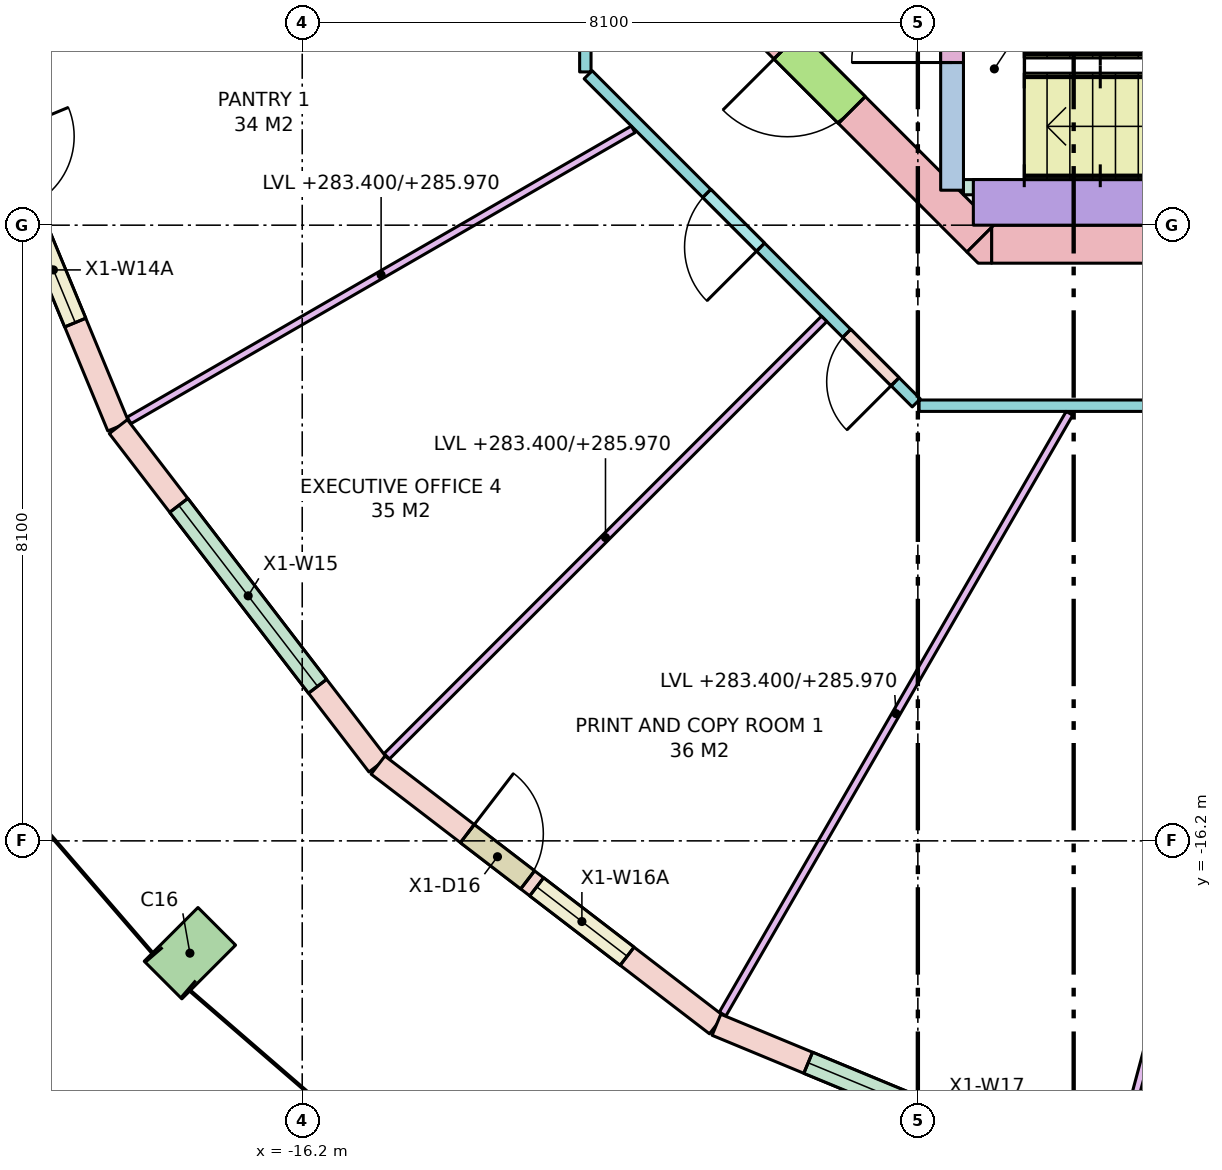
"""IFC4 building model, lengths in metres.
Left out: names, types, materials, properties, quantities, classifications, styles, units other than length and angle.
Written with IfcOpenShell. Run it as: python <this file> out.ifc"""

import sys

from ifc_helpers import new_model, si_unit, direction, frame, frame_2d, origin, origin_2d, place, context, subcontext, project, spatial, polyline, rectangle, outline, extrude, element, fill, save


model = new_model("IFC4")
c1 = context("Model", 3, precision=1e-05, world=origin(), true_north=direction((0.0, 1.0)))
c2 = subcontext(c1, "Body", "Model", "MODEL_VIEW")
j1 = project(units=[si_unit("LENGTHUNIT", "METRE"), si_unit("PLANEANGLEUNIT", "RADIAN")], contexts=[c1])
p1 = place(None, origin())
s1 = spatial("IfcSite", under=j1, at=p1, CompositionType="ELEMENT")
p2 = place(p1, origin())
s2 = spatial("IfcBuilding", under=s1, at=p2, CompositionType="ELEMENT")
p3 = place(p2, frame((0.0, 0.0, 283.4)))
s3 = spatial("IfcBuildingStorey", under=s2, at=p3, CompositionType="ELEMENT", Elevation=283.4)
p4 = place(p3, frame((-17.678, -17.678, 0.0), z_axis=(0.0, 0.0, 1.0), x_axis=(0.707106781187, -0.707106781187, 0.0)))
e1 = element("IfcColumn", 1, at=p4, inside=s3, PredefinedType="COLUMN", context=c2, shape_type="SweptSolid", body=[
    extrude(rectangle(XDim=0.7, YDim=1.0, at=origin_2d()), origin(), (0.0, 0.0, 1.0), 3.7),
])
p5 = place(p3, frame((-7.13, -8.35, -0.28), z_axis=(0.0, 0.0, 1.0), x_axis=(1.0, 0.0, 0.0)))
e2 = element("IfcWall", 2, at=p5, inside=s3, PredefinedType="SHEAR", context=c2, shape_type="SweptSolid", body=[
    extrude(rectangle(XDim=14.26, YDim=0.5, at=frame_2d((7.13, 0.0))), origin(), (0.0, 0.0, 1.0), 3.7),
])
p6 = place(p5, frame((8.08, 0.0, 0.28)))
e3 = element("IfcOpeningElement", 3, at=p6, cuts=e2, PredefinedType="OPENING", context=c2, shape_type="SweptSolid", body=[
    extrude(rectangle(XDim=0.7, YDim=2.1, at=frame_2d((0.35, 1.05))), frame((0.0, 0.26, 0.0), z_axis=(0.0, -1.0, 0.0), x_axis=(1.0, 0.0, 0.0)), (0.0, 0.0, 1.0), 0.52),
])
p7 = place(p5, frame((6.205, 0.0, 0.28)))
e4 = element("IfcOpeningElement", 4, at=p7, cuts=e2, PredefinedType="OPENING", context=c2, shape_type="SweptSolid", body=[
    extrude(rectangle(XDim=0.9, YDim=2.1, at=frame_2d((0.45, 1.05))), frame((0.0, 0.26, 0.0), z_axis=(0.0, -1.0, 0.0), x_axis=(1.0, 0.0, 0.0)), (0.0, 0.0, 1.0), 0.52),
])
p8 = place(p5, frame((10.667, 0.0, 0.28)))
e5 = element("IfcOpeningElement", 5, at=p8, cuts=e2, PredefinedType="OPENING", context=c2, shape_type="SweptSolid", body=[
    extrude(rectangle(XDim=0.9, YDim=2.1, at=frame_2d((0.45, 1.05))), frame((0.0, 0.26, 0.0), z_axis=(0.0, -1.0, 0.0), x_axis=(1.0, 0.0, 0.0)), (0.0, 0.0, 1.0), 0.52),
])
p9 = place(p3, frame((-7.277, -8.277, -0.28), z_axis=(0.0, 0.0, 1.0), x_axis=(-0.707106781187, 0.707106781187, 0.0)))
e6 = element("IfcWall", 6, at=p9, inside=s3, PredefinedType="SHEAR", context=c2, shape_type="SweptSolid", body=[
    extrude(rectangle(XDim=4.243, YDim=0.5, at=frame_2d((2.121, 0.0))), origin(), (0.0, 0.0, 1.0), 3.7),
])
p10 = place(p9, frame((2.393, 0.0, 0.28)))
e7 = element("IfcOpeningElement", 7, at=p10, cuts=e6, PredefinedType="OPENING", context=c2, shape_type="SweptSolid", body=[
    extrude(rectangle(XDim=1.2, YDim=2.1, at=frame_2d((0.6, 1.05))), frame((0.0, 0.26, 0.0), z_axis=(0.0, -1.0, 0.0), x_axis=(1.0, 0.0, 0.0)), (0.0, 0.0, 1.0), 0.52),
])
p11 = place(p3, frame((0.0, 0.0, -0.28)))
e8 = element("IfcWall", 8, at=p11, inside=s3, PredefinedType="SHEAR", context=c2, shape_type="SweptSolid", body=[
    extrude(outline(polyline([(-7.307, -8.6), (-7.454, -8.454), (-7.13, -8.13), (-7.13, -8.6), (-7.307, -8.6)])), origin(), (0.0, 0.0, 1.0), 3.7),
])
p12 = place(p3, frame((-7.65, -7.64, 0.0), z_axis=(0.0, 0.0, 1.0), x_axis=(0.0, 1.0, 0.0)))
e9 = element("IfcWall", 9, at=p12, inside=s3, PredefinedType="SHEAR", context=c2, shape_type="SweptSolid", body=[
    extrude(rectangle(XDim=3.14, YDim=0.3, at=frame_2d((1.57, 0.0))), origin(), (0.0, 0.0, 1.0), 3.42),
])
p13 = place(p12, frame((1.68, 0.0, 0.0)))
e10 = element("IfcOpeningElement", 10, at=p13, cuts=e9, PredefinedType="OPENING", context=c2, shape_type="SweptSolid", body=[
    extrude(rectangle(XDim=1.32, YDim=2.1, at=frame_2d((0.66, 1.05))), frame((0.0, 0.16, 0.0), z_axis=(0.0, -1.0, 0.0), x_axis=(1.0, 0.0, 0.0)), (0.0, 0.0, 1.0), 0.32),
])
p14 = place(p3, frame((-7.5, -7.6, 0.0), z_axis=(0.0, 0.0, 1.0), x_axis=(1.0, 0.0, 0.0)))
e11 = element("IfcWall", 11, at=p14, inside=s3, PredefinedType="SHEAR", context=c2, shape_type="SweptSolid", body=[
    extrude(rectangle(XDim=0.6, YDim=0.2, at=frame_2d((0.3, 0.0))), origin(), (0.0, 0.0, 1.0), 3.42),
])
p15 = place(p3, frame((-7.37, -7.8, 0.0), z_axis=(0.0, 0.0, 1.0), x_axis=(1.0, 0.0, 0.0)))
e12 = element("IfcWall", 12, at=p15, inside=s3, PredefinedType="SHEAR", context=c2, shape_type="SweptSolid", body=[
    extrude(rectangle(XDim=5.37, YDim=0.6, at=frame_2d((2.685, 0.0))), origin(), (0.0, 0.0, 1.0), 3.42),
])
p16 = place(p3, frame((-20.767, -5.565, 0.0), z_axis=(0.0, 0.0, 1.0), x_axis=(0.382702670405, -0.92387156362, 0.0)))
e13 = element("IfcWall", 13, at=p16, inside=s3, PredefinedType="STANDARD", context=c2, shape_type="SweptSolid", body=[
    extrude(rectangle(XDim=5.613, YDim=0.3, at=frame_2d((2.806, 0.0))), origin(), (0.0, 0.0, 1.0), 3.42),
])
p17 = place(p16, frame((1.481, 0.0, 0.0)))
e14 = element("IfcOpeningElement", 14, at=p17, cuts=e13, PredefinedType="OPENING", context=c2, shape_type="SweptSolid", body=[
    extrude(rectangle(XDim=1.0, YDim=2.4, at=frame_2d((0.5, 1.2))), frame((0.0, 0.16, 0.0), z_axis=(0.0, -1.0, 0.0), x_axis=(1.0, 0.0, 0.0)), (0.0, 0.0, 1.0), 0.32),
])
p18 = place(p16, frame((2.631, 0.0, 0.8)))
e15 = element("IfcOpeningElement", 15, at=p18, cuts=e13, PredefinedType="OPENING", context=c2, shape_type="SweptSolid", body=[
    extrude(rectangle(XDim=1.5, YDim=2.4, at=frame_2d((0.75, 1.2))), frame((0.0, 0.16, 0.0), z_axis=(0.0, -1.0, 0.0), x_axis=(1.0, 0.0, 0.0)), (0.0, 0.0, 1.0), 0.32),
])
p19 = place(p3, frame((-18.619, -10.75, 0.0), z_axis=(0.0, 0.0, 1.0), x_axis=(0.608726467567, -0.793380165925, 0.0)))
e16 = element("IfcWall", 16, at=p19, inside=s3, PredefinedType="STANDARD", context=c2, shape_type="SweptSolid", body=[
    extrude(rectangle(XDim=5.613, YDim=0.3, at=frame_2d((2.806, 0.0))), origin(), (0.0, 0.0, 1.0), 3.42),
])
p20 = place(p19, frame((1.306, 0.0, 0.8)))
e17 = element("IfcOpeningElement", 17, at=p20, cuts=e16, PredefinedType="OPENING", context=c2, shape_type="SweptSolid", body=[
    extrude(rectangle(XDim=3.0, YDim=2.4, at=frame_2d((1.5, 1.2))), frame((0.0, 0.16, 0.0), z_axis=(0.0, -1.0, 0.0), x_axis=(1.0, 0.0, 0.0)), (0.0, 0.0, 1.0), 0.32),
])
p21 = place(p3, frame((-15.203, -15.203, 0.0), z_axis=(0.0, 0.0, 1.0), x_axis=(0.793380165925, -0.608726467567, 0.0)))
e18 = element("IfcWall", 18, at=p21, inside=s3, PredefinedType="STANDARD", context=c2, shape_type="SweptSolid", body=[
    extrude(rectangle(XDim=5.613, YDim=0.3, at=frame_2d((2.806, 0.0))), origin(), (0.0, 0.0, 1.0), 3.42),
])
p22 = place(p21, frame((1.481, 0.0, 0.0)))
e19 = element("IfcOpeningElement", 19, at=p22, cuts=e18, PredefinedType="OPENING", context=c2, shape_type="SweptSolid", body=[
    extrude(rectangle(XDim=1.0, YDim=2.4, at=frame_2d((0.5, 1.2))), frame((0.0, 0.16, 0.0), z_axis=(0.0, -1.0, 0.0), x_axis=(1.0, 0.0, 0.0)), (0.0, 0.0, 1.0), 0.32),
])
p23 = place(p21, frame((2.631, 0.0, 0.8)))
e20 = element("IfcOpeningElement", 20, at=p23, cuts=e18, PredefinedType="OPENING", context=c2, shape_type="SweptSolid", body=[
    extrude(rectangle(XDim=1.5, YDim=2.4, at=frame_2d((0.75, 1.2))), frame((0.0, 0.16, 0.0), z_axis=(0.0, -1.0, 0.0), x_axis=(1.0, 0.0, 0.0)), (0.0, 0.0, 1.0), 0.32),
])
p24 = place(p3, frame((-10.75, -18.619, 0.0), z_axis=(0.0, 0.0, 1.0), x_axis=(0.92387156362, -0.382702670405, 0.0)))
e21 = element("IfcWall", 21, at=p24, inside=s3, PredefinedType="STANDARD", context=c2, shape_type="SweptSolid", body=[
    extrude(rectangle(XDim=5.613, YDim=0.3, at=frame_2d((2.806, 0.0))), origin(), (0.0, 0.0, 1.0), 3.42),
])
p25 = place(p24, frame((1.306, 0.0, 0.8)))
e22 = element("IfcOpeningElement", 22, at=p25, cuts=e21, PredefinedType="OPENING", context=c2, shape_type="SweptSolid", body=[
    extrude(rectangle(XDim=3.0, YDim=2.4, at=frame_2d((1.5, 1.2))), frame((0.0, 0.16, 0.0), z_axis=(0.0, -1.0, 0.0), x_axis=(1.0, 0.0, 0.0)), (0.0, 0.0, 1.0), 0.32),
])
p26 = place(p3, frame((8.084, -10.475, 0.0), z_axis=(0.0, 0.0, 1.0), x_axis=(-1.0, 0.0, 0.0)))
e23 = element("IfcWall", 23, at=p26, inside=s3, PredefinedType="PARTITIONING", context=c2, shape_type="SweptSolid", body=[
    extrude(rectangle(XDim=16.167, YDim=0.15, at=frame_2d((8.084, 0.0))), origin(), (0.0, 0.0, 1.0), 2.57),
])
p27 = place(p26, frame((12.065, 0.0, 0.0)))
e24 = element("IfcOpeningElement", 24, at=p27, cuts=e23, PredefinedType="OPENING", context=c2, shape_type="SweptSolid", body=[
    extrude(rectangle(XDim=0.9, YDim=2.1, at=frame_2d((0.45, 1.05))), frame((0.0, 0.085, 0.0), z_axis=(0.0, -1.0, 0.0), x_axis=(1.0, 0.0, 0.0)), (0.0, 0.0, 1.0), 0.17),
])
p28 = place(p26, frame((7.584, 0.0, 0.0)))
e25 = element("IfcOpeningElement", 25, at=p28, cuts=e23, PredefinedType="OPENING", context=c2, shape_type="SweptSolid", body=[
    extrude(rectangle(XDim=1.0, YDim=2.1, at=frame_2d((0.5, 1.05))), frame((0.0, 0.085, 0.0), z_axis=(0.0, -1.0, 0.0), x_axis=(1.0, 0.0, 0.0)), (0.0, 0.0, 1.0), 0.17),
])
p29 = place(p26, frame((3.153, 0.0, 0.0)))
e26 = element("IfcOpeningElement", 26, at=p29, cuts=e23, PredefinedType="OPENING", context=c2, shape_type="SweptSolid", body=[
    extrude(rectangle(XDim=1.0, YDim=2.1, at=frame_2d((0.5, 1.05))), frame((0.0, 0.085, 0.0), z_axis=(0.0, -1.0, 0.0), x_axis=(1.0, 0.0, 0.0)), (0.0, 0.0, 1.0), 0.17),
])
p30 = place(p3, frame((-8.121, -10.438, 0.0), z_axis=(0.0, 0.0, 1.0), x_axis=(-0.707106781187, 0.707106781187, 0.0)))
e27 = element("IfcWall", 27, at=p30, inside=s3, PredefinedType="PARTITIONING", context=c2, shape_type="SweptSolid", body=[
    extrude(rectangle(XDim=6.105, YDim=0.15, at=frame_2d((3.053, 0.0))), origin(), (0.0, 0.0, 1.0), 2.57),
])
p31 = place(p30, frame((2.897, 0.0, 0.0)))
e28 = element("IfcOpeningElement", 28, at=p31, cuts=e27, PredefinedType="OPENING", context=c2, shape_type="SweptSolid", body=[
    extrude(rectangle(XDim=1.0, YDim=2.1, at=frame_2d((0.5, 1.05))), frame((0.0, 0.085, 0.0), z_axis=(0.0, -1.0, 0.0), x_axis=(1.0, 0.0, 0.0)), (0.0, 0.0, 1.0), 0.17),
])
p32 = place(p30, frame((0.394, 0.0, 0.0)))
e29 = element("IfcOpeningElement", 29, at=p32, cuts=e27, PredefinedType="OPENING", context=c2, shape_type="SweptSolid", body=[
    extrude(rectangle(XDim=0.9, YDim=2.1, at=frame_2d((0.45, 1.05))), frame((0.0, 0.085, 0.0), z_axis=(0.0, -1.0, 0.0), x_axis=(1.0, 0.0, 0.0)), (0.0, 0.0, 1.0), 0.17),
])
p33 = place(p3, frame((-12.475, -6.084, 0.0), z_axis=(0.0, 0.0, 1.0), x_axis=(0.0, 1.0, 0.0)))
e30 = element("IfcWall", 30, at=p33, inside=s3, PredefinedType="PARTITIONING", context=c2, shape_type="SweptSolid", body=[
    extrude(rectangle(XDim=12.167, YDim=0.15, at=frame_2d((6.084, 0.0))), origin(), (0.0, 0.0, 1.0), 2.57),
])
p34 = place(p33, frame((10.322, 0.0, 0.0)))
e31 = element("IfcOpeningElement", 31, at=p34, cuts=e30, PredefinedType="OPENING", context=c2, shape_type="SweptSolid", body=[
    extrude(rectangle(XDim=0.9, YDim=2.1, at=frame_2d((0.45, 1.05))), frame((0.0, 0.085, 0.0), z_axis=(0.0, -1.0, 0.0), x_axis=(1.0, 0.0, 0.0)), (0.0, 0.0, 1.0), 0.17),
])
p35 = place(p33, frame((7.256, 0.0, 0.0)))
e32 = element("IfcOpeningElement", 32, at=p35, cuts=e30, PredefinedType="OPENING", context=c2, shape_type="SweptSolid", body=[
    extrude(rectangle(XDim=1.0, YDim=2.1, at=frame_2d((0.5, 1.05))), frame((0.0, 0.085, 0.0), z_axis=(0.0, -1.0, 0.0), x_axis=(1.0, 0.0, 0.0)), (0.0, 0.0, 1.0), 0.17),
])
p36 = place(p33, frame((3.912, 0.0, 0.0)))
e33 = element("IfcOpeningElement", 33, at=p36, cuts=e30, PredefinedType="OPENING", context=c2, shape_type="SweptSolid", body=[
    extrude(rectangle(XDim=1.0, YDim=2.1, at=frame_2d((0.5, 1.05))), frame((0.0, 0.085, 0.0), z_axis=(0.0, -1.0, 0.0), x_axis=(1.0, 0.0, 0.0)), (0.0, 0.0, 1.0), 0.17),
])
p37 = place(p33, frame((0.946, 0.0, 0.0)))
e34 = element("IfcOpeningElement", 34, at=p37, cuts=e30, PredefinedType="OPENING", context=c2, shape_type="SweptSolid", body=[
    extrude(rectangle(XDim=0.9, YDim=2.1, at=frame_2d((0.45, 1.05))), frame((0.0, 0.085, 0.0), z_axis=(0.0, -1.0, 0.0), x_axis=(1.0, 0.0, 0.0)), (0.0, 0.0, 1.0), 0.17),
])
p38 = place(p3, frame((-11.846, -6.839, 0.0), z_axis=(0.0, 0.0, 1.0), x_axis=(-0.866007734672, -0.500030602552, 0.0)))
e35 = element("IfcWall", 35, at=p38, inside=s3, PredefinedType="PARTITIONING", context=c2, shape_type="SweptSolid", body=[
    extrude(rectangle(XDim=7.658, YDim=0.1, at=frame_2d((3.829, 0.0))), origin(), (0.0, 0.0, 1.0), 2.57),
])
p39 = place(p3, frame((-9.333, -9.333, 0.0), z_axis=(0.0, 0.0, 1.0), x_axis=(-0.707106781187, -0.707106781187, 0.0)))
e36 = element("IfcWall", 36, at=p39, inside=s3, PredefinedType="PARTITIONING", context=c2, shape_type="SweptSolid", body=[
    extrude(rectangle(XDim=8.139, YDim=0.1, at=frame_2d((4.069, 0.0))), origin(), (0.0, 0.0, 1.0), 2.57),
])
p40 = place(p3, frame((-6.105, -10.575, 0.0), z_axis=(0.0, 0.0, 1.0), x_axis=(-0.500020406621, -0.866013621696, 0.0)))
e37 = element("IfcWall", 37, at=p40, inside=s3, PredefinedType="PARTITIONING", context=c2, shape_type="SweptSolid", body=[
    extrude(rectangle(XDim=9.126, YDim=0.1, at=frame_2d((4.563, 0.0))), origin(), (0.0, 0.0, 1.0), 2.57),
])
p41 = place(p3, frame((-2.831, -10.564, 0.0), z_axis=(0.0, 0.0, 1.0), x_axis=(-0.258796321138, -0.965931914871, 0.0)))
e38 = element("IfcWall", 38, at=p41, inside=s3, PredefinedType="PARTITIONING", context=c2, shape_type="SweptSolid", body=[
    extrude(rectangle(XDim=10.4, YDim=0.1, at=frame_2d((5.2, 0.0))), origin(), (0.0, 0.0, 1.0), 2.57),
])
p42 = place(p18, origin())
e39 = element("IfcWindow", 39, at=p42, inside=s3, PartitioningType="SINGLE_PANEL", PredefinedType="WINDOW", context=c2, shape_type="SweptSolid", body=[
    extrude(rectangle(XDim=1.5, YDim=2.4, at=frame_2d((0.75, 1.2))), frame((0.0, 0.03, 0.0), z_axis=(0.0, -1.0, 0.0), x_axis=(1.0, 0.0, 0.0)), (0.0, 0.0, 1.0), 0.06),
])
fill(e15, e39)
p43 = place(p20, origin())
e40 = element("IfcWindow", 40, at=p43, inside=s3, PartitioningType="SINGLE_PANEL", PredefinedType="WINDOW", context=c2, shape_type="SweptSolid", body=[
    extrude(rectangle(XDim=3.0, YDim=2.4, at=frame_2d((1.5, 1.2))), frame((0.0, 0.03, 0.0), z_axis=(0.0, -1.0, 0.0), x_axis=(1.0, 0.0, 0.0)), (0.0, 0.0, 1.0), 0.06),
])
fill(e17, e40)
p44 = place(p22, origin())
e41 = element("IfcDoor", 41, at=p44, inside=s3, OperationType="SINGLE_SWING_LEFT", PredefinedType="DOOR", context=c2, shape_type="SweptSolid", body=[
    extrude(rectangle(XDim=1.0, YDim=2.4, at=frame_2d((0.5, 1.2))), frame((0.0, 0.025, 0.0), z_axis=(0.0, -1.0, 0.0), x_axis=(1.0, 0.0, 0.0)), (0.0, 0.0, 1.0), 0.05),
])
fill(e19, e41)
p45 = place(p23, origin())
e42 = element("IfcWindow", 42, at=p45, inside=s3, PartitioningType="SINGLE_PANEL", PredefinedType="WINDOW", context=c2, shape_type="SweptSolid", body=[
    extrude(rectangle(XDim=1.5, YDim=2.4, at=frame_2d((0.75, 1.2))), frame((0.0, 0.03, 0.0), z_axis=(0.0, -1.0, 0.0), x_axis=(1.0, 0.0, 0.0)), (0.0, 0.0, 1.0), 0.06),
])
fill(e20, e42)
p46 = place(p25, origin())
e43 = element("IfcWindow", 43, at=p46, inside=s3, PartitioningType="SINGLE_PANEL", PredefinedType="WINDOW", context=c2, shape_type="SweptSolid", body=[
    extrude(rectangle(XDim=3.0, YDim=2.4, at=frame_2d((1.5, 1.2))), frame((0.0, 0.03, 0.0), z_axis=(0.0, -1.0, 0.0), x_axis=(1.0, 0.0, 0.0)), (0.0, 0.0, 1.0), 0.06),
])
fill(e22, e43)
p47 = place(p13, origin())
e44 = element("IfcDoor", 44, at=p47, inside=s3, OperationType="DOUBLE_DOOR_SINGLE_SWING", PredefinedType="DOOR", context=c2, shape_type="SweptSolid", body=[
    extrude(rectangle(XDim=1.32, YDim=2.1, at=frame_2d((0.66, 1.05))), frame((0.0, 0.025, 0.0), z_axis=(0.0, -1.0, 0.0), x_axis=(1.0, 0.0, 0.0)), (0.0, 0.0, 1.0), 0.05),
])
fill(e10, e44)
p48 = place(p10, origin())
e45 = element("IfcDoor", 45, at=p48, inside=s3, OperationType="SINGLE_SWING_RIGHT", PredefinedType="DOOR", context=c2, shape_type="SweptSolid", body=[
    extrude(rectangle(XDim=1.2, YDim=2.1, at=frame_2d((0.6, 1.05))), frame((0.0, 0.025, 0.0), z_axis=(0.0, -1.0, 0.0), x_axis=(1.0, 0.0, 0.0)), (0.0, 0.0, 1.0), 0.05),
])
fill(e7, e45)
p49 = place(p31, origin())
e46 = element("IfcDoor", 46, at=p49, inside=s3, OperationType="SINGLE_SWING_LEFT", PredefinedType="DOOR", context=c2, shape_type="SweptSolid", body=[
    extrude(rectangle(XDim=1.0, YDim=2.1, at=frame_2d((0.5, 1.05))), frame((0.0, 0.025, 0.0), z_axis=(0.0, -1.0, 0.0), x_axis=(1.0, 0.0, 0.0)), (0.0, 0.0, 1.0), 0.05),
])
fill(e28, e46)
p50 = place(p32, origin())
e47 = element("IfcDoor", 47, at=p50, inside=s3, OperationType="SINGLE_SWING_LEFT", PredefinedType="DOOR", context=c2, shape_type="SweptSolid", body=[
    extrude(rectangle(XDim=0.9, YDim=2.1, at=frame_2d((0.45, 1.05))), frame((0.0, 0.025, 0.0), z_axis=(0.0, -1.0, 0.0), x_axis=(1.0, 0.0, 0.0)), (0.0, 0.0, 1.0), 0.05),
])
fill(e29, e47)
save(model, sys.argv[1])
